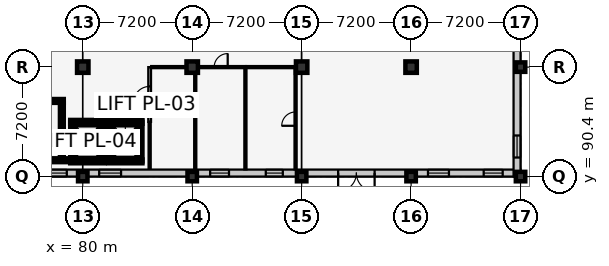
"""IFC4 building model, lengths in metres.
Left out: names, types, materials, properties, quantities, classifications, styles, units other than length and angle.
Written with IfcOpenShell. Run it as: python <this file> out.ifc"""

import sys

from ifc_helpers import new_model, si_unit, direction, frame, frame_2d, origin, origin_2d, place, context, subcontext, project, spatial, rectangle, circle, extrude, element, fill, save


model = new_model("IFC4")
c1 = context("Model", 3, precision=1e-05, world=origin(), true_north=direction((0.0, 1.0)))
c2 = subcontext(c1, "Body", "Model", "MODEL_VIEW")
j1 = project(units=[si_unit("LENGTHUNIT", "METRE"), si_unit("PLANEANGLEUNIT", "RADIAN")], contexts=[c1])
p1 = place(None, origin())
s1 = spatial("IfcSite", under=j1, at=p1, CompositionType="ELEMENT")
p2 = place(p1, origin())
s2 = spatial("IfcBuilding", under=s1, at=p2, CompositionType="ELEMENT")
p3 = place(p2, origin())
s3 = spatial("IfcBuildingStorey", under=s2, at=p3, CompositionType="ELEMENT", Elevation=0.0)
p4 = place(p3, frame((80.0, 90.4, 0.0), z_axis=(0.0, 0.0, 1.0), x_axis=(1.0, 0.0, 0.0)))
e1 = element("IfcColumn", 1, at=p4, inside=s3, PredefinedType="COLUMN", context=c2, shape_type="SweptSolid", body=[
    extrude(rectangle(XDim=0.62, YDim=0.62, at=origin_2d()), origin(), (0.0, 0.0, 1.0), 5.4),
])
p5 = place(p3, frame((80.0, 97.6, 0.0), z_axis=(0.0, 0.0, 1.0), x_axis=(1.0, 0.0, 0.0)))
e2 = element("IfcColumn", 2, at=p5, inside=s3, PredefinedType="COLUMN", context=c2, shape_type="SweptSolid", body=[
    extrude(circle(Radius=0.375, at=origin_2d()), origin(), (0.0, 0.0, 1.0), 5.4),
])
p6 = place(p3, frame((87.2, 90.4, 0.0), z_axis=(0.0, 0.0, 1.0), x_axis=(1.0, 0.0, 0.0)))
e3 = element("IfcColumn", 3, at=p6, inside=s3, PredefinedType="COLUMN", context=c2, shape_type="SweptSolid", body=[
    extrude(rectangle(XDim=0.62, YDim=0.62, at=origin_2d()), origin(), (0.0, 0.0, 1.0), 5.4),
])
p7 = place(p3, frame((87.2, 97.6, 0.0), z_axis=(0.0, 0.0, 1.0), x_axis=(1.0, 0.0, 0.0)))
e4 = element("IfcColumn", 4, at=p7, inside=s3, PredefinedType="COLUMN", context=c2, shape_type="SweptSolid", body=[
    extrude(circle(Radius=0.375, at=origin_2d()), origin(), (0.0, 0.0, 1.0), 5.4),
])
p8 = place(p3, frame((94.4, 90.4, 0.0), z_axis=(0.0, 0.0, 1.0), x_axis=(1.0, 0.0, 0.0)))
e5 = element("IfcColumn", 5, at=p8, inside=s3, PredefinedType="COLUMN", context=c2, shape_type="SweptSolid", body=[
    extrude(rectangle(XDim=0.62, YDim=0.62, at=origin_2d()), origin(), (0.0, 0.0, 1.0), 5.4),
])
p9 = place(p3, frame((94.4, 97.6, 0.0), z_axis=(0.0, 0.0, 1.0), x_axis=(1.0, 0.0, 0.0)))
e6 = element("IfcColumn", 6, at=p9, inside=s3, PredefinedType="COLUMN", context=c2, shape_type="SweptSolid", body=[
    extrude(circle(Radius=0.375, at=origin_2d()), origin(), (0.0, 0.0, 1.0), 5.4),
])
p10 = place(p3, frame((101.6, 90.4, 0.0), z_axis=(0.0, 0.0, 1.0), x_axis=(1.0, 0.0, 0.0)))
e7 = element("IfcColumn", 7, at=p10, inside=s3, PredefinedType="COLUMN", context=c2, shape_type="SweptSolid", body=[
    extrude(rectangle(XDim=0.62, YDim=0.62, at=origin_2d()), origin(), (0.0, 0.0, 1.0), 5.4),
])
p11 = place(p3, frame((101.6, 97.6, 0.0), z_axis=(0.0, 0.0, 1.0), x_axis=(1.0, 0.0, 0.0)))
e8 = element("IfcColumn", 8, at=p11, inside=s3, PredefinedType="COLUMN", context=c2, shape_type="SweptSolid", body=[
    extrude(circle(Radius=0.375, at=origin_2d()), origin(), (0.0, 0.0, 1.0), 5.4),
])
for number, where, z_axis, x_axis in (
    (9, (108.8, 90.4, 0.0), (0.0, 0.0, 1.0), (1.0, 0.0, 0.0)),
    (10, (108.8, 97.6, 0.0), (0.0, 0.0, 1.0), (1.0, 0.0, 0.0)),
):
    element("IfcColumn", number, at=place(p3, frame(where, z_axis=z_axis, x_axis=x_axis)), inside=s3, PredefinedType="COLUMN", context=c2, shape_type="SweptSolid", body=[
        extrude(rectangle(XDim=0.62, YDim=0.62, at=origin_2d()), origin(), (0.0, 0.0, 1.0), 5.4),
    ])
p12 = place(p3, frame((108.8, 90.63, 0.0), z_axis=(0.0, 0.0, 1.0), x_axis=(-1.0, 0.0, 0.0)))
e11 = element("IfcWall", 11, at=p12, inside=s3, PredefinedType="SOLIDWALL", context=c2, shape_type="SweptSolid", body=[
    extrude(rectangle(XDim=43.2, YDim=0.46, at=frame_2d((21.6, 0.0))), origin(), (0.0, 0.0, 1.0), 4.415),
])
p13 = place(p12, frame((9.6, 0.0, 0.0)))
e12 = element("IfcOpeningElement", 12, at=p13, cuts=e11, PredefinedType="OPENING", context=c2, shape_type="SweptSolid", body=[
    extrude(rectangle(XDim=2.4, YDim=2.4, at=frame_2d((1.2, 1.2))), frame((0.0, 0.242, 0.0), z_axis=(0.0, -1.0, 0.0), x_axis=(1.0, 0.0, 0.0)), (0.0, 0.0, 1.0), 0.484),
])
p14 = place(p12, frame((1.175, 0.0, 0.9)))
e13 = element("IfcOpeningElement", 13, at=p14, cuts=e11, PredefinedType="OPENING", context=c2, shape_type="SweptSolid", body=[
    extrude(rectangle(XDim=1.25, YDim=1.6, at=frame_2d((0.625, 0.8))), frame((0.0, 0.242, 0.0), z_axis=(0.0, -1.0, 0.0), x_axis=(1.0, 0.0, 0.0)), (0.0, 0.0, 1.0), 0.484),
])
p15 = place(p12, frame((4.71, 0.0, 0.9)))
e14 = element("IfcOpeningElement", 14, at=p15, cuts=e11, PredefinedType="OPENING", context=c2, shape_type="SweptSolid", body=[
    extrude(rectangle(XDim=1.38, YDim=1.6, at=frame_2d((0.69, 0.8))), frame((0.0, 0.242, 0.0), z_axis=(0.0, -1.0, 0.0), x_axis=(1.0, 0.0, 0.0)), (0.0, 0.0, 1.0), 0.484),
])
p16 = place(p12, frame((15.64, 0.0, 0.9)))
e15 = element("IfcOpeningElement", 15, at=p16, cuts=e11, PredefinedType="OPENING", context=c2, shape_type="SweptSolid", body=[
    extrude(rectangle(XDim=1.12, YDim=1.75, at=frame_2d((0.56, 0.875))), frame((0.0, 0.242, 0.0), z_axis=(0.0, -1.0, 0.0), x_axis=(1.0, 0.0, 0.0)), (0.0, 0.0, 1.0), 0.484),
])
p17 = place(p12, frame((19.18, 0.0, 0.9)))
e16 = element("IfcOpeningElement", 16, at=p17, cuts=e11, PredefinedType="OPENING", context=c2, shape_type="SweptSolid", body=[
    extrude(rectangle(XDim=1.24, YDim=1.75, at=frame_2d((0.62, 0.875))), frame((0.0, 0.242, 0.0), z_axis=(0.0, -1.0, 0.0), x_axis=(1.0, 0.0, 0.0)), (0.0, 0.0, 1.0), 0.484),
])
p18 = place(p12, frame((26.28, 0.0, 0.9)))
e17 = element("IfcOpeningElement", 17, at=p18, cuts=e11, PredefinedType="OPENING", context=c2, shape_type="SweptSolid", body=[
    extrude(rectangle(XDim=1.44, YDim=1.75, at=frame_2d((0.72, 0.875))), frame((0.0, 0.242, 0.0), z_axis=(0.0, -1.0, 0.0), x_axis=(1.0, 0.0, 0.0)), (0.0, 0.0, 1.0), 0.484),
])
p19 = place(p12, frame((29.85, 0.0, 0.9)))
e18 = element("IfcOpeningElement", 18, at=p19, cuts=e11, PredefinedType="OPENING", context=c2, shape_type="SweptSolid", body=[
    extrude(rectangle(XDim=1.5, YDim=1.75, at=frame_2d((0.75, 0.875))), frame((0.0, 0.242, 0.0), z_axis=(0.0, -1.0, 0.0), x_axis=(1.0, 0.0, 0.0)), (0.0, 0.0, 1.0), 0.484),
])
p20 = place(p12, frame((33.75, 0.0, 0.9)))
e19 = element("IfcOpeningElement", 19, at=p20, cuts=e11, PredefinedType="OPENING", context=c2, shape_type="SweptSolid", body=[
    extrude(rectangle(XDim=0.9, YDim=1.35, at=frame_2d((0.45, 0.675))), frame((0.0, 0.242, 0.0), z_axis=(0.0, -1.0, 0.0), x_axis=(1.0, 0.0, 0.0)), (0.0, 0.0, 1.0), 0.484),
])
p21 = place(p12, frame((40.85, 0.0, 0.9)))
e20 = element("IfcOpeningElement", 20, at=p21, cuts=e11, PredefinedType="OPENING", context=c2, shape_type="SweptSolid", body=[
    extrude(rectangle(XDim=1.1, YDim=1.35, at=frame_2d((0.55, 0.675))), frame((0.0, 0.242, 0.0), z_axis=(0.0, -1.0, 0.0), x_axis=(1.0, 0.0, 0.0)), (0.0, 0.0, 1.0), 0.484),
])
p22 = place(p3, frame((108.57, 126.0, 0.0), z_axis=(0.0, 0.0, 1.0), x_axis=(0.0, -1.0, 0.0)))
e21 = element("IfcWall", 21, at=p22, inside=s3, PredefinedType="SOLIDWALL", context=c2, shape_type="SweptSolid", body=[
    extrude(rectangle(XDim=35.6, YDim=0.46, at=frame_2d((17.8, 0.0))), origin(), (0.0, 0.0, 1.0), 4.515),
])
p23 = place(p22, frame((1.378, 0.0, 0.9)))
e22 = element("IfcOpeningElement", 22, at=p23, cuts=e21, PredefinedType="OPENING", context=c2, shape_type="SweptSolid", body=[
    extrude(rectangle(XDim=1.2, YDim=1.35, at=frame_2d((0.6, 0.675))), frame((0.0, 0.242, 0.0), z_axis=(0.0, -1.0, 0.0), x_axis=(1.0, 0.0, 0.0)), (0.0, 0.0, 1.0), 0.484),
])
p24 = place(p22, frame((9.189, 0.0, 0.9)))
e23 = element("IfcOpeningElement", 23, at=p24, cuts=e21, PredefinedType="OPENING", context=c2, shape_type="SweptSolid", body=[
    extrude(rectangle(XDim=1.4, YDim=1.35, at=frame_2d((0.7, 0.675))), frame((0.0, 0.242, 0.0), z_axis=(0.0, -1.0, 0.0), x_axis=(1.0, 0.0, 0.0)), (0.0, 0.0, 1.0), 0.484),
])
p25 = place(p22, frame((17.275, 0.0, 0.9)))
e24 = element("IfcOpeningElement", 24, at=p25, cuts=e21, PredefinedType="OPENING", context=c2, shape_type="SweptSolid", body=[
    extrude(rectangle(XDim=1.05, YDim=1.45, at=frame_2d((0.525, 0.725))), frame((0.0, 0.242, 0.0), z_axis=(0.0, -1.0, 0.0), x_axis=(1.0, 0.0, 0.0)), (0.0, 0.0, 1.0), 0.484),
])
p26 = place(p22, frame((32.897, 0.0, 0.9)))
e25 = element("IfcOpeningElement", 25, at=p26, cuts=e21, PredefinedType="OPENING", context=c2, shape_type="SweptSolid", body=[
    extrude(rectangle(XDim=1.45, YDim=1.45, at=frame_2d((0.725, 0.725))), frame((0.0, 0.242, 0.0), z_axis=(0.0, -1.0, 0.0), x_axis=(1.0, 0.0, 0.0)), (0.0, 0.0, 1.0), 0.484),
])
p27 = place(p3, frame((69.75, 91.475, 0.0), z_axis=(0.0, 0.0, 1.0), x_axis=(1.0, 0.0, 0.0)))
e26 = element("IfcWall", 26, at=p27, inside=s3, PredefinedType="SHEAR", context=c2, shape_type="SweptSolid", body=[
    extrude(rectangle(XDim=9.57, YDim=0.25, at=frame_2d((4.785, 0.0))), origin(), (0.0, 0.0, 1.0), 5.12),
])
p28 = place(p3, frame((78.75, 95.375, 0.0), z_axis=(0.0, 0.0, 1.0), x_axis=(-1.0, 0.0, 0.0)))
e27 = element("IfcWall", 27, at=p28, inside=s3, PredefinedType="SHEAR", context=c2, shape_type="SweptSolid", body=[
    extrude(rectangle(XDim=9.0, YDim=0.25, at=frame_2d((4.5, 0.0))), origin(), (0.0, 0.0, 1.0), 5.12),
])
p29 = place(p3, frame((78.625, 91.6, 0.0), z_axis=(0.0, 0.0, 1.0), x_axis=(0.0, 1.0, 0.0)))
e28 = element("IfcWall", 28, at=p29, inside=s3, PredefinedType="SHEAR", context=c2, shape_type="SweptSolid", body=[
    extrude(rectangle(XDim=3.65, YDim=0.25, at=frame_2d((1.825, 0.0))), origin(), (0.0, 0.0, 1.0), 5.12),
])
p30 = place(p3, frame((79.175, 91.4, 0.0), z_axis=(0.0, 0.0, 1.0), x_axis=(1.0, 0.0, 0.0)))
e29 = element("IfcWall", 29, at=p30, inside=s3, PredefinedType="SHEAR", context=c2, shape_type="SweptSolid", body=[
    extrude(rectangle(XDim=2.25, YDim=0.25, at=frame_2d((1.125, 0.0))), origin(), (0.0, 0.0, 1.0), 5.12),
])
p31 = place(p3, frame((81.425, 94.0, 0.0), z_axis=(0.0, 0.0, 1.0), x_axis=(-1.0, 0.0, 0.0)))
e30 = element("IfcWall", 30, at=p31, inside=s3, PredefinedType="SHEAR", context=c2, shape_type="SweptSolid", body=[
    extrude(rectangle(XDim=2.25, YDim=0.25, at=frame_2d((1.125, 0.0))), origin(), (0.0, 0.0, 1.0), 5.12),
])
p32 = place(p31, frame((0.625, 0.0, 0.0)))
e31 = element("IfcOpeningElement", 31, at=p32, cuts=e30, PredefinedType="OPENING", context=c2, shape_type="SweptSolid", body=[
    extrude(rectangle(XDim=1.0, YDim=2.15, at=frame_2d((0.5, 1.075))), frame((0.0, 0.137, 0.0), z_axis=(0.0, -1.0, 0.0), x_axis=(1.0, 0.0, 0.0)), (0.0, 0.0, 1.0), 0.274),
])
for number, where, z_axis, x_axis in (
    (32, (79.3, 94.0, 0.0), (0.0, 0.0, 1.0), (0.0, -1.0, 0.0)),
    (33, (81.3, 91.4, 0.0), (0.0, 0.0, 1.0), (0.0, 1.0, 0.0)),
):
    element("IfcWall", number, at=place(p3, frame(where, z_axis=z_axis, x_axis=x_axis)), inside=s3, PredefinedType="SHEAR", context=c2, shape_type="SweptSolid", body=[
        extrude(rectangle(XDim=2.6, YDim=0.25, at=frame_2d((1.3, 0.0))), origin(), (0.0, 0.0, 1.0), 5.12),
    ])
p33 = place(p3, frame((81.675, 91.4, 0.0), z_axis=(0.0, 0.0, 1.0), x_axis=(1.0, 0.0, 0.0)))
e34 = element("IfcWall", 34, at=p33, inside=s3, PredefinedType="SHEAR", context=c2, shape_type="SweptSolid", body=[
    extrude(rectangle(XDim=2.25, YDim=0.25, at=frame_2d((1.125, 0.0))), origin(), (0.0, 0.0, 1.0), 5.12),
])
p34 = place(p3, frame((83.925, 94.0, 0.0), z_axis=(0.0, 0.0, 1.0), x_axis=(-1.0, 0.0, 0.0)))
e35 = element("IfcWall", 35, at=p34, inside=s3, PredefinedType="SHEAR", context=c2, shape_type="SweptSolid", body=[
    extrude(rectangle(XDim=2.25, YDim=0.25, at=frame_2d((1.125, 0.0))), origin(), (0.0, 0.0, 1.0), 5.12),
])
p35 = place(p34, frame((0.625, 0.0, 0.0)))
e36 = element("IfcOpeningElement", 36, at=p35, cuts=e35, PredefinedType="OPENING", context=c2, shape_type="SweptSolid", body=[
    extrude(rectangle(XDim=1.0, YDim=2.15, at=frame_2d((0.5, 1.075))), frame((0.0, 0.137, 0.0), z_axis=(0.0, -1.0, 0.0), x_axis=(1.0, 0.0, 0.0)), (0.0, 0.0, 1.0), 0.274),
])
for number, where, z_axis, x_axis in (
    (37, (81.8, 94.0, 0.0), (0.0, 0.0, 1.0), (0.0, -1.0, 0.0)),
    (38, (83.8, 91.4, 0.0), (0.0, 0.0, 1.0), (0.0, 1.0, 0.0)),
):
    element("IfcWall", number, at=place(p3, frame(where, z_axis=z_axis, x_axis=x_axis)), inside=s3, PredefinedType="SHEAR", context=c2, shape_type="SweptSolid", body=[
        extrude(rectangle(XDim=2.6, YDim=0.25, at=frame_2d((1.3, 0.0))), origin(), (0.0, 0.0, 1.0), 5.12),
    ])
p36 = place(p3, frame((84.4, 94.0, 0.0), z_axis=(0.0, 0.0, 1.0), x_axis=(0.0, 1.0, 0.0)))
e39 = element("IfcWall", 39, at=p36, inside=s3, PredefinedType="PARTITIONING", context=c2, shape_type="SweptSolid", body=[
    extrude(rectangle(XDim=3.6, YDim=0.18, at=frame_2d((1.8, 0.0))), origin(), (0.0, 0.0, 1.0), 5.12),
])
p37 = place(p36, frame((1.27, 0.0, 0.0)))
e40 = element("IfcOpeningElement", 40, at=p37, cuts=e39, PredefinedType="OPENING", context=c2, shape_type="SweptSolid", body=[
    extrude(rectangle(XDim=1.06, YDim=2.1, at=frame_2d((0.53, 1.05))), frame((0.0, 0.102, 0.0), z_axis=(0.0, -1.0, 0.0), x_axis=(1.0, 0.0, 0.0)), (0.0, 0.0, 1.0), 0.204),
])
p38 = place(p3, frame((84.5, 97.6, 0.0), z_axis=(0.0, 0.0, 1.0), x_axis=(1.0, 0.0, 0.0)))
e41 = element("IfcWall", 41, at=p38, inside=s3, PredefinedType="PARTITIONING", context=c2, shape_type="SweptSolid", body=[
    extrude(rectangle(XDim=2.9, YDim=0.14, at=frame_2d((1.45, 0.0))), origin(), (0.0, 0.0, 1.0), 4.395),
])
p39 = place(p3, frame((87.4, 90.87, 0.0), z_axis=(0.0, 0.0, 1.0), x_axis=(0.0, 1.0, 0.0)))
e42 = element("IfcWall", 42, at=p39, inside=s3, PredefinedType="PARTITIONING", context=c2, shape_type="SweptSolid", body=[
    extrude(rectangle(XDim=6.65, YDim=0.14, at=frame_2d((3.325, 0.0))), origin(), (0.0, 0.0, 1.0), 4.495),
])
p40 = place(p3, frame((87.48, 97.6, 0.0), z_axis=(0.0, 0.0, 1.0), x_axis=(1.0, 0.0, 0.0)))
e43 = element("IfcWall", 43, at=p40, inside=s3, PredefinedType="PARTITIONING", context=c2, shape_type="SweptSolid", body=[
    extrude(rectangle(XDim=3.22, YDim=0.14, at=frame_2d((1.61, 0.0))), origin(), (0.0, 0.0, 1.0), 4.345),
])
p41 = place(p40, frame((1.165, 0.0, 0.0)))
e44 = element("IfcOpeningElement", 44, at=p41, cuts=e43, PredefinedType="OPENING", context=c2, shape_type="SweptSolid", body=[
    extrude(rectangle(XDim=0.89, YDim=2.05, at=frame_2d((0.445, 1.025))), frame((0.0, 0.082, 0.0), z_axis=(0.0, -1.0, 0.0), x_axis=(1.0, 0.0, 0.0)), (0.0, 0.0, 1.0), 0.164),
])
p42 = place(p3, frame((90.7, 90.87, 0.0), z_axis=(0.0, 0.0, 1.0), x_axis=(0.0, 1.0, 0.0)))
e45 = element("IfcWall", 45, at=p42, inside=s3, PredefinedType="PARTITIONING", context=c2, shape_type="SweptSolid", body=[
    extrude(rectangle(XDim=6.65, YDim=0.14, at=frame_2d((3.325, 0.0))), origin(), (0.0, 0.0, 1.0), 4.785),
])
p43 = place(p3, frame((90.78, 97.6, 0.0), z_axis=(0.0, 0.0, 1.0), x_axis=(1.0, 0.0, 0.0)))
e46 = element("IfcWall", 46, at=p43, inside=s3, PredefinedType="PARTITIONING", context=c2, shape_type="SweptSolid", body=[
    extrude(rectangle(XDim=3.22, YDim=0.14, at=frame_2d((1.61, 0.0))), origin(), (0.0, 0.0, 1.0), 4.345),
])
p44 = place(p3, frame((94.0, 90.87, 0.0), z_axis=(0.0, 0.0, 1.0), x_axis=(0.0, 1.0, 0.0)))
e47 = element("IfcWall", 47, at=p44, inside=s3, PredefinedType="PARTITIONING", context=c2, shape_type="SweptSolid", body=[
    extrude(rectangle(XDim=6.65, YDim=0.14, at=frame_2d((3.325, 0.0))), origin(), (0.0, 0.0, 1.0), 5.12),
])
p45 = place(p44, frame((2.87, 0.0, 0.0)))
e48 = element("IfcOpeningElement", 48, at=p45, cuts=e47, PredefinedType="OPENING", context=c2, shape_type="SweptSolid", body=[
    extrude(rectangle(XDim=0.91, YDim=2.06, at=frame_2d((0.455, 1.03))), frame((0.0, 0.082, 0.0), z_axis=(0.0, -1.0, 0.0), x_axis=(1.0, 0.0, 0.0)), (0.0, 0.0, 1.0), 0.164),
])
p46 = place(p3, frame((84.4, 90.95, 0.0), z_axis=(0.0, 0.0, 1.0), x_axis=(0.0, 1.0, 0.0)))
e49 = element("IfcWall", 49, at=p46, inside=s3, PredefinedType="PARTITIONING", context=c2, shape_type="SweptSolid", body=[
    extrude(rectangle(XDim=3.0, YDim=0.14, at=frame_2d((1.5, 0.0))), origin(), (0.0, 0.0, 1.0), 5.12),
])
p47 = place(p13, origin())
e50 = element("IfcDoor", 50, at=p47, inside=s3, OperationType="DOUBLE_DOOR_SINGLE_SWING", PredefinedType="DOOR", context=c2, shape_type="SweptSolid", body=[
    extrude(rectangle(XDim=2.4, YDim=2.4, at=frame_2d((1.2, 1.2))), frame((0.0, 0.025, 0.0), z_axis=(0.0, -1.0, 0.0), x_axis=(1.0, 0.0, 0.0)), (0.0, 0.0, 1.0), 0.05),
])
fill(e12, e50)
p48 = place(p14, origin())
e51 = element("IfcWindow", 51, at=p48, inside=s3, PartitioningType="SINGLE_PANEL", PredefinedType="WINDOW", context=c2, shape_type="SweptSolid", body=[
    extrude(rectangle(XDim=1.25, YDim=1.6, at=frame_2d((0.625, 0.8))), frame((0.0, 0.03, 0.0), z_axis=(0.0, -1.0, 0.0), x_axis=(1.0, 0.0, 0.0)), (0.0, 0.0, 1.0), 0.06),
])
fill(e13, e51)
p49 = place(p15, origin())
e52 = element("IfcWindow", 52, at=p49, inside=s3, PartitioningType="SINGLE_PANEL", PredefinedType="WINDOW", context=c2, shape_type="SweptSolid", body=[
    extrude(rectangle(XDim=1.38, YDim=1.6, at=frame_2d((0.69, 0.8))), frame((0.0, 0.03, 0.0), z_axis=(0.0, -1.0, 0.0), x_axis=(1.0, 0.0, 0.0)), (0.0, 0.0, 1.0), 0.06),
])
fill(e14, e52)
p50 = place(p16, origin())
e53 = element("IfcWindow", 53, at=p50, inside=s3, PartitioningType="SINGLE_PANEL", PredefinedType="WINDOW", context=c2, shape_type="SweptSolid", body=[
    extrude(rectangle(XDim=1.12, YDim=1.75, at=frame_2d((0.56, 0.875))), frame((0.0, 0.03, 0.0), z_axis=(0.0, -1.0, 0.0), x_axis=(1.0, 0.0, 0.0)), (0.0, 0.0, 1.0), 0.06),
])
fill(e15, e53)
p51 = place(p17, origin())
e54 = element("IfcWindow", 54, at=p51, inside=s3, PartitioningType="SINGLE_PANEL", PredefinedType="WINDOW", context=c2, shape_type="SweptSolid", body=[
    extrude(rectangle(XDim=1.24, YDim=1.75, at=frame_2d((0.62, 0.875))), frame((0.0, 0.03, 0.0), z_axis=(0.0, -1.0, 0.0), x_axis=(1.0, 0.0, 0.0)), (0.0, 0.0, 1.0), 0.06),
])
fill(e16, e54)
p52 = place(p18, origin())
e55 = element("IfcWindow", 55, at=p52, inside=s3, PartitioningType="SINGLE_PANEL", PredefinedType="WINDOW", context=c2, shape_type="SweptSolid", body=[
    extrude(rectangle(XDim=1.44, YDim=1.75, at=frame_2d((0.72, 0.875))), frame((0.0, 0.03, 0.0), z_axis=(0.0, -1.0, 0.0), x_axis=(1.0, 0.0, 0.0)), (0.0, 0.0, 1.0), 0.06),
])
fill(e17, e55)
p53 = place(p19, origin())
e56 = element("IfcWindow", 56, at=p53, inside=s3, PartitioningType="SINGLE_PANEL", PredefinedType="WINDOW", context=c2, shape_type="SweptSolid", body=[
    extrude(rectangle(XDim=1.5, YDim=1.75, at=frame_2d((0.75, 0.875))), frame((0.0, 0.03, 0.0), z_axis=(0.0, -1.0, 0.0), x_axis=(1.0, 0.0, 0.0)), (0.0, 0.0, 1.0), 0.06),
])
fill(e18, e56)
p54 = place(p26, origin())
e57 = element("IfcWindow", 57, at=p54, inside=s3, PartitioningType="SINGLE_PANEL", PredefinedType="WINDOW", context=c2, shape_type="SweptSolid", body=[
    extrude(rectangle(XDim=1.45, YDim=1.45, at=frame_2d((0.725, 0.725))), frame((0.0, 0.03, 0.0), z_axis=(0.0, -1.0, 0.0), x_axis=(1.0, 0.0, 0.0)), (0.0, 0.0, 1.0), 0.06),
])
fill(e25, e57)
p55 = place(p32, origin())
e58 = element("IfcDoor", 58, at=p55, inside=s3, OperationType="SLIDING_TO_LEFT", PredefinedType="DOOR", context=c2, shape_type="SweptSolid", body=[
    extrude(rectangle(XDim=1.0, YDim=2.15, at=frame_2d((0.5, 1.075))), frame((0.0, 0.025, 0.0), z_axis=(0.0, -1.0, 0.0), x_axis=(1.0, 0.0, 0.0)), (0.0, 0.0, 1.0), 0.05),
])
fill(e31, e58)
p56 = place(p35, origin())
e59 = element("IfcDoor", 59, at=p56, inside=s3, OperationType="SLIDING_TO_LEFT", PredefinedType="DOOR", context=c2, shape_type="SweptSolid", body=[
    extrude(rectangle(XDim=1.0, YDim=2.15, at=frame_2d((0.5, 1.075))), frame((0.0, 0.025, 0.0), z_axis=(0.0, -1.0, 0.0), x_axis=(1.0, 0.0, 0.0)), (0.0, 0.0, 1.0), 0.05),
])
fill(e36, e59)
p57 = place(p37, origin())
e60 = element("IfcDoor", 60, at=p57, inside=s3, OperationType="SINGLE_SWING_LEFT", PredefinedType="DOOR", context=c2, shape_type="SweptSolid", body=[
    extrude(rectangle(XDim=1.06, YDim=2.1, at=frame_2d((0.53, 1.05))), frame((0.0, 0.025, 0.0), z_axis=(0.0, -1.0, 0.0), x_axis=(1.0, 0.0, 0.0)), (0.0, 0.0, 1.0), 0.05),
])
fill(e40, e60)
p58 = place(p41, origin())
e61 = element("IfcDoor", 61, at=p58, inside=s3, OperationType="SINGLE_SWING_RIGHT", PredefinedType="DOOR", context=c2, shape_type="SweptSolid", body=[
    extrude(rectangle(XDim=0.89, YDim=2.05, at=frame_2d((0.445, 1.025))), frame((0.0, 0.025, 0.0), z_axis=(0.0, -1.0, 0.0), x_axis=(1.0, 0.0, 0.0)), (0.0, 0.0, 1.0), 0.05),
])
fill(e44, e61)
p59 = place(p45, origin())
e62 = element("IfcDoor", 62, at=p59, inside=s3, OperationType="SINGLE_SWING_LEFT", PredefinedType="DOOR", context=c2, shape_type="SweptSolid", body=[
    extrude(rectangle(XDim=0.91, YDim=2.06, at=frame_2d((0.455, 1.03))), frame((0.0, 0.025, 0.0), z_axis=(0.0, -1.0, 0.0), x_axis=(1.0, 0.0, 0.0)), (0.0, 0.0, 1.0), 0.05),
])
fill(e48, e62)
save(model, sys.argv[1])
